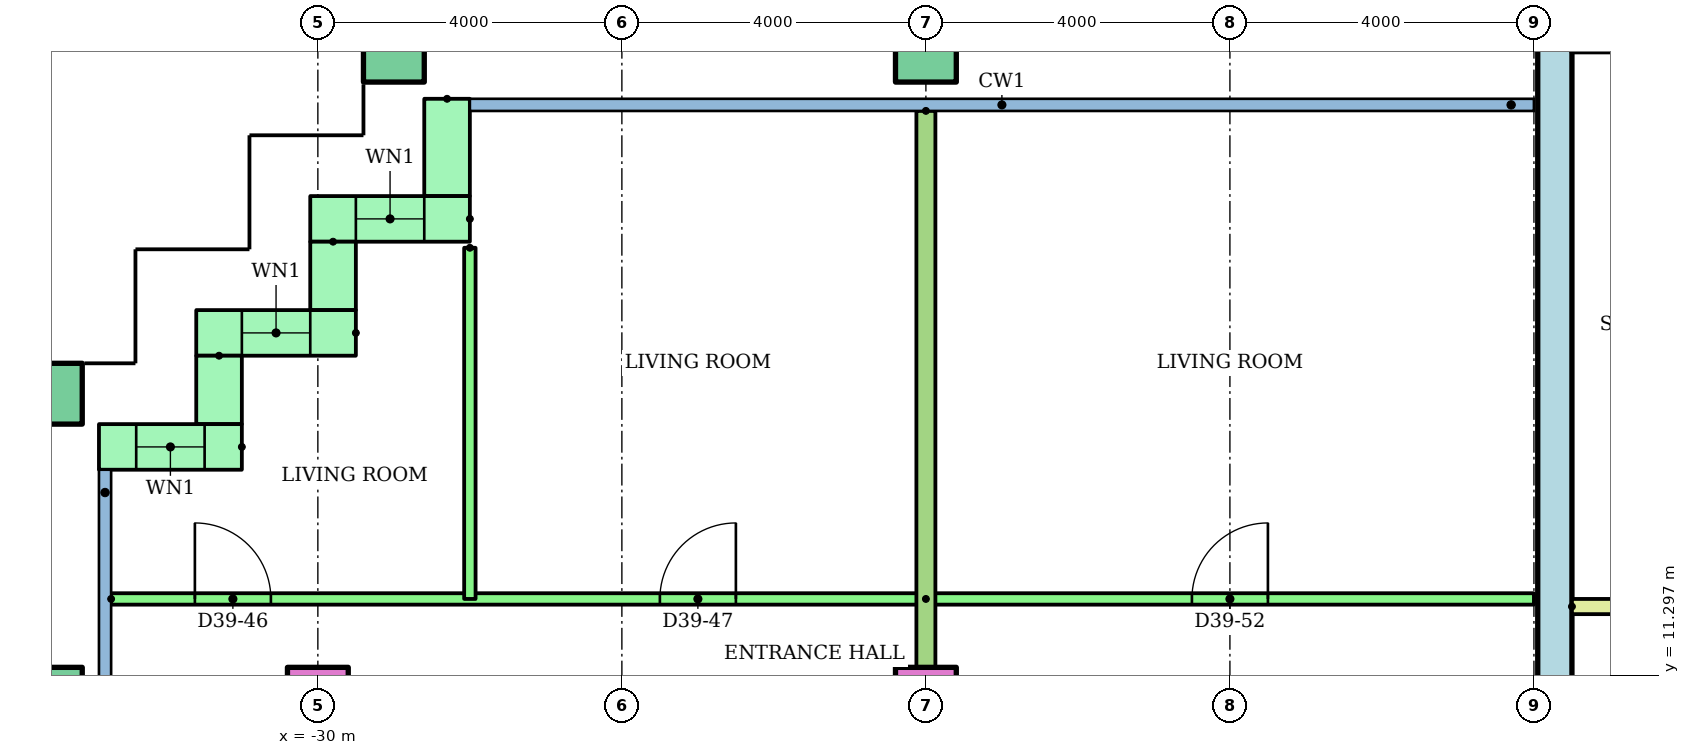
"""IFC4 building model, lengths in metres.
Left out: names, types, materials, properties, quantities, classifications, styles, units other than length and angle.
Written with IfcOpenShell. Run it as: python <this file> out.ifc"""

import sys

from ifc_helpers import new_model, si_unit, direction, frame, frame_2d, origin, origin_2d, place, context, subcontext, project, spatial, rectangle, hollow_rectangle, extrude, element, fill, save


model = new_model("IFC4")
c1 = context("Model", 3, precision=1e-05, world=origin(), true_north=direction((0.0, 1.0)))
c2 = subcontext(c1, "Body", "Model", "MODEL_VIEW")
j1 = project(units=[si_unit("LENGTHUNIT", "METRE"), si_unit("PLANEANGLEUNIT", "RADIAN")], contexts=[c1])
p1 = place(None, origin())
s1 = spatial("IfcSite", under=j1, at=p1, CompositionType="ELEMENT")
p2 = place(p1, origin())
s2 = spatial("IfcBuilding", under=s1, at=p2, CompositionType="ELEMENT")
p3 = place(p2, frame((0.0, 0.0, 148.6)))
s3 = spatial("IfcBuildingStorey", under=s2, at=p3, CompositionType="ELEMENT", Elevation=148.6)
p4 = place(p3, frame((-33.5, 11.0, 0.0)))
e1 = element("IfcColumn", 1, at=p4, inside=s3, PredefinedType="COLUMN", context=c2, shape_type="SweptSolid", body=[
    extrude(hollow_rectangle(XDim=0.8, YDim=0.8, WallThickness=0.04, at=origin_2d()), origin(), (0.0, 0.0, 1.0), 3.2),
])
for number, where in (
    (2, (-30.0, 11.0, 0.0)),
    (3, (-22.0, 11.0, 0.0)),
):
    element("IfcColumn", number, at=place(p3, frame(where)), inside=s3, PredefinedType="COLUMN", context=c2, shape_type="SweptSolid", body=[
        extrude(rectangle(XDim=0.8, YDim=0.8, at=origin_2d()), origin(), (0.0, 0.0, 1.0), 3.2),
    ])
for number, where in (
    (4, (-33.5, 15.0, 0.0)),
    (5, (-29.0, 19.5, 0.0)),
    (6, (-22.0, 19.5, 0.0)),
):
    element("IfcColumn", number, at=place(p3, frame(where)), inside=s3, PredefinedType="COLUMN", context=c2, shape_type="SweptSolid", body=[
        extrude(hollow_rectangle(XDim=0.8, YDim=0.8, WallThickness=0.04, at=origin_2d()), origin(), (0.0, 0.0, 1.0), 3.2),
    ])
p5 = place(p3, frame((-28.3, 18.88, 0.0), z_axis=(0.0, 0.0, 1.0), x_axis=(0.0, -1.0, 0.0)))
e7 = element("IfcWall", 7, at=p5, inside=s3, PredefinedType="STANDARD", context=c2, shape_type="SweptSolid", body=[
    extrude(rectangle(XDim=1.28, YDim=0.6, at=frame_2d((0.64, 0.0))), origin(), (0.0, 0.0, 1.0), 2.8),
])
p6 = place(p3, frame((-28.0, 17.3, 0.0), z_axis=(0.0, 0.0, 1.0), x_axis=(-1.0, 0.0, 0.0)))
e8 = element("IfcWall", 8, at=p6, inside=s3, PredefinedType="STANDARD", context=c2, shape_type="SweptSolid", body=[
    extrude(rectangle(XDim=2.1, YDim=0.6, at=frame_2d((1.05, 0.0))), origin(), (0.0, 0.0, 1.0), 2.8),
])
p7 = place(p6, frame((0.6, 0.0, 0.9)))
e9 = element("IfcOpeningElement", 9, at=p7, cuts=e8, PredefinedType="OPENING", context=c2, shape_type="SweptSolid", body=[
    extrude(rectangle(XDim=0.9, YDim=1.5, at=frame_2d((0.45, 0.75))), frame((0.0, 0.31, 0.0), z_axis=(0.0, -1.0, 0.0), x_axis=(1.0, 0.0, 0.0)), (0.0, 0.0, 1.0), 0.62),
])
p8 = place(p3, frame((-29.8, 17.0, 0.0), z_axis=(0.0, 0.0, 1.0), x_axis=(0.0, -1.0, 0.0)))
e10 = element("IfcWall", 10, at=p8, inside=s3, PredefinedType="STANDARD", context=c2, shape_type="SweptSolid", body=[
    extrude(rectangle(XDim=0.9, YDim=0.6, at=frame_2d((0.45, 0.0))), origin(), (0.0, 0.0, 1.0), 2.8),
])
p9 = place(p3, frame((-29.5, 15.8, 0.0), z_axis=(0.0, 0.0, 1.0), x_axis=(-1.0, 0.0, 0.0)))
e11 = element("IfcWall", 11, at=p9, inside=s3, PredefinedType="STANDARD", context=c2, shape_type="SweptSolid", body=[
    extrude(rectangle(XDim=2.1, YDim=0.6, at=frame_2d((1.05, 0.0))), origin(), (0.0, 0.0, 1.0), 2.8),
])
p10 = place(p9, frame((0.6, 0.0, 0.9)))
e12 = element("IfcOpeningElement", 12, at=p10, cuts=e11, PredefinedType="OPENING", context=c2, shape_type="SweptSolid", body=[
    extrude(rectangle(XDim=0.9, YDim=1.5, at=frame_2d((0.45, 0.75))), frame((0.0, 0.31, 0.0), z_axis=(0.0, -1.0, 0.0), x_axis=(1.0, 0.0, 0.0)), (0.0, 0.0, 1.0), 0.62),
])
p11 = place(p3, frame((-31.3, 15.5, 0.0), z_axis=(0.0, 0.0, 1.0), x_axis=(0.0, -1.0, 0.0)))
e13 = element("IfcWall", 13, at=p11, inside=s3, PredefinedType="STANDARD", context=c2, shape_type="SweptSolid", body=[
    extrude(rectangle(XDim=0.9, YDim=0.6, at=frame_2d((0.45, 0.0))), origin(), (0.0, 0.0, 1.0), 2.8),
])
p12 = place(p3, frame((-31.0, 14.3, 0.0), z_axis=(0.0, 0.0, 1.0), x_axis=(-1.0, 0.0, 0.0)))
e14 = element("IfcWall", 14, at=p12, inside=s3, PredefinedType="STANDARD", context=c2, shape_type="SweptSolid", body=[
    extrude(rectangle(XDim=1.88, YDim=0.6, at=frame_2d((0.94, 0.0))), origin(), (0.0, 0.0, 1.0), 2.8),
])
p13 = place(p12, frame((0.49, 0.0, 0.9)))
e15 = element("IfcOpeningElement", 15, at=p13, cuts=e14, PredefinedType="OPENING", context=c2, shape_type="SweptSolid", body=[
    extrude(rectangle(XDim=0.9, YDim=1.5, at=frame_2d((0.45, 0.75))), frame((0.0, 0.31, 0.0), z_axis=(0.0, -1.0, 0.0), x_axis=(1.0, 0.0, 0.0)), (0.0, 0.0, 1.0), 0.62),
])
p14 = place(p3, frame((-13.725, 3.0, 0.0), z_axis=(0.0, 0.0, 1.0), x_axis=(0.0, 1.0, 0.0)))
e16 = element("IfcWall", 16, at=p14, inside=s3, PredefinedType="SHEAR", context=c2, shape_type="SweptSolid", body=[
    extrude(rectangle(XDim=17.0, YDim=0.45, at=frame_2d((8.5, 0.0))), origin(), (0.0, 0.0, 1.0), 2.8),
])
p15 = place(p3, frame((-13.5, 12.2, 0.0)))
e17 = element("IfcWall", 17, at=p15, inside=s3, PredefinedType="PARTITIONING", context=c2, shape_type="SweptSolid", body=[
    extrude(rectangle(XDim=3.9, YDim=0.2, at=frame_2d((1.95, 0.0))), origin(), (0.0, 0.0, 1.0), 2.8),
])
p16 = place(p3, frame((-32.72, 12.3, 0.0)))
e18 = element("IfcWall", 18, at=p16, inside=s3, PredefinedType="PARTITIONING", context=c2, shape_type="SweptSolid", body=[
    extrude(rectangle(XDim=10.72, YDim=0.15, at=frame_2d((5.36, 0.0))), origin(), (0.0, 0.0, 1.0), 2.4),
])
p17 = place(p16, frame((1.102, 0.0, 0.0)))
e19 = element("IfcOpeningElement", 19, at=p17, cuts=e18, PredefinedType="OPENING", context=c2, shape_type="SweptSolid", body=[
    extrude(rectangle(XDim=1.0, YDim=2.1, at=frame_2d((0.5, 1.05))), frame((0.0, 0.085, 0.0), z_axis=(0.0, -1.0, 0.0), x_axis=(1.0, 0.0, 0.0)), (0.0, 0.0, 1.0), 0.17),
])
p18 = place(p16, frame((7.22, 0.0, 0.0)))
e20 = element("IfcOpeningElement", 20, at=p18, cuts=e18, PredefinedType="OPENING", context=c2, shape_type="SweptSolid", body=[
    extrude(rectangle(XDim=1.0, YDim=2.1, at=frame_2d((0.5, 1.05))), frame((0.0, 0.085, 0.0), z_axis=(0.0, -1.0, 0.0), x_axis=(1.0, 0.0, 0.0)), (0.0, 0.0, 1.0), 0.17),
])
p19 = place(p3, frame((-28.0, 16.92, 0.0), z_axis=(0.0, 0.0, 1.0), x_axis=(0.0, -1.0, 0.0)))
e21 = element("IfcWall", 21, at=p19, inside=s3, PredefinedType="PARTITIONING", context=c2, shape_type="SweptSolid", body=[
    extrude(rectangle(XDim=4.62, YDim=0.15, at=frame_2d((2.31, 0.0))), origin(), (0.0, 0.0, 1.0), 2.4),
])
p20 = place(p3, frame((-22.0, 12.3, 0.0)))
e22 = element("IfcWall", 22, at=p20, inside=s3, PredefinedType="PARTITIONING", context=c2, shape_type="SweptSolid", body=[
    extrude(rectangle(XDim=8.0, YDim=0.15, at=frame_2d((4.0, 0.0))), origin(), (0.0, 0.0, 1.0), 2.4),
])
p21 = place(p20, frame((3.5, 0.0, 0.0)))
e23 = element("IfcOpeningElement", 23, at=p21, cuts=e22, PredefinedType="OPENING", context=c2, shape_type="SweptSolid", body=[
    extrude(rectangle(XDim=1.0, YDim=2.1, at=frame_2d((0.5, 1.05))), frame((0.0, 0.085, 0.0), z_axis=(0.0, -1.0, 0.0), x_axis=(1.0, 0.0, 0.0)), (0.0, 0.0, 1.0), 0.17),
])
p22 = place(p3, frame((-22.0, 18.721, 0.0), z_axis=(0.0, 0.0, 1.0), x_axis=(0.0, -1.0, 0.0)))
e24 = element("IfcWall", 24, at=p22, inside=s3, PredefinedType="PARTITIONING", context=c2, shape_type="SweptSolid", body=[
    extrude(rectangle(XDim=17.321, YDim=0.25, at=frame_2d((8.661, 0.0))), origin(), (0.0, 0.0, 1.0), 2.4),
])
p23 = place(p7, origin())
e25 = element("IfcWindow", 25, at=p23, inside=s3, PartitioningType="SINGLE_PANEL", PredefinedType="WINDOW", context=c2, shape_type="SweptSolid", body=[
    extrude(rectangle(XDim=0.9, YDim=1.5, at=frame_2d((0.45, 0.75))), frame((0.0, 0.03, 0.0), z_axis=(0.0, -1.0, 0.0), x_axis=(1.0, 0.0, 0.0)), (0.0, 0.0, 1.0), 0.06),
])
fill(e9, e25)
p24 = place(p10, origin())
e26 = element("IfcWindow", 26, at=p24, inside=s3, PartitioningType="SINGLE_PANEL", PredefinedType="WINDOW", context=c2, shape_type="SweptSolid", body=[
    extrude(rectangle(XDim=0.9, YDim=1.5, at=frame_2d((0.45, 0.75))), frame((0.0, 0.03, 0.0), z_axis=(0.0, -1.0, 0.0), x_axis=(1.0, 0.0, 0.0)), (0.0, 0.0, 1.0), 0.06),
])
fill(e12, e26)
p25 = place(p13, origin())
e27 = element("IfcWindow", 27, at=p25, inside=s3, PartitioningType="SINGLE_PANEL", PredefinedType="WINDOW", context=c2, shape_type="SweptSolid", body=[
    extrude(rectangle(XDim=0.9, YDim=1.5, at=frame_2d((0.45, 0.75))), frame((0.0, 0.03, 0.0), z_axis=(0.0, -1.0, 0.0), x_axis=(1.0, 0.0, 0.0)), (0.0, 0.0, 1.0), 0.06),
])
fill(e15, e27)
p26 = place(p17, origin())
e28 = element("IfcDoor", 28, at=p26, inside=s3, OperationType="SINGLE_SWING_LEFT", PredefinedType="DOOR", context=c2, shape_type="SweptSolid", body=[
    extrude(rectangle(XDim=1.0, YDim=2.1, at=frame_2d((0.5, 1.05))), frame((0.0, 0.025, 0.0), z_axis=(0.0, -1.0, 0.0), x_axis=(1.0, 0.0, 0.0)), (0.0, 0.0, 1.0), 0.05),
])
fill(e19, e28)
p27 = place(p18, origin())
e29 = element("IfcDoor", 29, at=p27, inside=s3, OperationType="SINGLE_SWING_RIGHT", PredefinedType="DOOR", context=c2, shape_type="SweptSolid", body=[
    extrude(rectangle(XDim=1.0, YDim=2.1, at=frame_2d((0.5, 1.05))), frame((0.0, 0.025, 0.0), z_axis=(0.0, -1.0, 0.0), x_axis=(1.0, 0.0, 0.0)), (0.0, 0.0, 1.0), 0.05),
])
fill(e20, e29)
p28 = place(p21, origin())
e30 = element("IfcDoor", 30, at=p28, inside=s3, OperationType="SINGLE_SWING_RIGHT", PredefinedType="DOOR", context=c2, shape_type="SweptSolid", body=[
    extrude(rectangle(XDim=1.0, YDim=2.1, at=frame_2d((0.5, 1.05))), frame((0.0, 0.025, 0.0), z_axis=(0.0, -1.0, 0.0), x_axis=(1.0, 0.0, 0.0)), (0.0, 0.0, 1.0), 0.05),
])
fill(e23, e30)
save(model, sys.argv[1])
